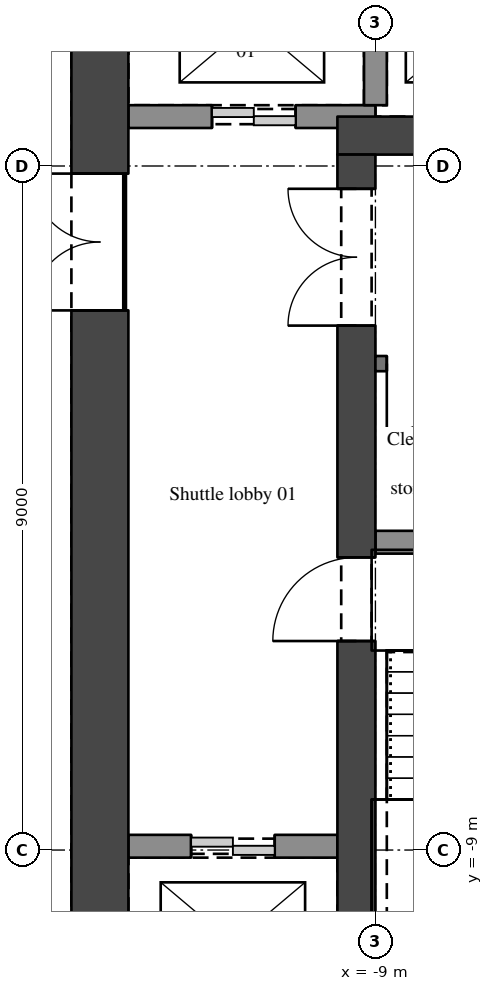
"""IFC4 building model, lengths in metres.
Left out: names, types, materials, properties, quantities, classifications, styles, units other than length and angle.
Written with IfcOpenShell. Run it as: python <this file> out.ifc"""

import sys

from ifc_helpers import new_model, si_unit, direction, frame, frame_2d, origin, place, context, subcontext, project, spatial, rectangle, extrude, element, fill, save


model = new_model("IFC4")
c1 = context("Model", 3, precision=1e-05, world=origin(), true_north=direction((0.0, 1.0)))
c2 = subcontext(c1, "Body", "Model", "MODEL_VIEW")
j1 = project(units=[si_unit("LENGTHUNIT", "METRE"), si_unit("PLANEANGLEUNIT", "RADIAN")], contexts=[c1])
p1 = place(None, origin())
s1 = spatial("IfcSite", under=j1, at=p1, CompositionType="ELEMENT")
p2 = place(p1, origin())
s2 = spatial("IfcBuilding", under=s1, at=p2, CompositionType="ELEMENT")
p3 = place(p2, frame((0.0, 0.0, 162.3)))
s3 = spatial("IfcBuildingStorey", under=s2, at=p3, CompositionType="ELEMENT", Elevation=162.3)
p4 = place(p3, frame((-12.625, -11.5, 0.0), z_axis=(0.0, 0.0, 1.0), x_axis=(0.0, 1.0, 0.0)))
e1 = element("IfcWall", 1, at=p4, inside=s3, PredefinedType="SHEAR", context=c2, shape_type="SweptSolid", body=[
    extrude(rectangle(XDim=14.65, YDim=0.75, at=frame_2d((7.325, 0.0))), origin(), (0.0, 0.0, 1.0), 5.4),
])
p5 = place(p4, frame((9.6, 0.0, 0.0)))
e2 = element("IfcOpeningElement", 2, at=p5, cuts=e1, PredefinedType="OPENING", context=c2, shape_type="SweptSolid", body=[
    extrude(rectangle(XDim=1.8, YDim=2.1, at=frame_2d((0.9, 1.05))), frame((0.0, 0.385, 0.0), z_axis=(0.0, -1.0, 0.0), x_axis=(1.0, 0.0, 0.0)), (0.0, 0.0, 1.0), 0.77),
])
p6 = place(p3, frame((-9.5, 0.4, 0.0), z_axis=(0.0, 0.0, 1.0), x_axis=(1.0, 0.0, 0.0)))
e3 = element("IfcWall", 3, at=p6, inside=s3, PredefinedType="SHEAR", context=c2, shape_type="SweptSolid", body=[
    extrude(rectangle(XDim=19.0, YDim=0.5, at=frame_2d((9.5, 0.0))), origin(), (0.0, 0.0, 1.0), 5.4),
])
p7 = place(p6, frame((1.3, 0.0, 0.0)))
e4 = element("IfcOpeningElement", 4, at=p7, cuts=e3, PredefinedType="OPENING", context=c2, shape_type="SweptSolid", body=[
    extrude(rectangle(XDim=1.1, YDim=2.1, at=frame_2d((0.55, 1.05))), frame((0.0, 0.26, 0.0), z_axis=(0.0, -1.0, 0.0), x_axis=(1.0, 0.0, 0.0)), (0.0, 0.0, 1.0), 0.52),
])
p8 = place(p6, frame((4.0, 0.0, 0.0)))
e5 = element("IfcOpeningElement", 5, at=p8, cuts=e3, PredefinedType="OPENING", context=c2, shape_type="SweptSolid", body=[
    extrude(rectangle(XDim=1.1, YDim=2.1, at=frame_2d((0.55, 1.05))), frame((0.0, 0.26, 0.0), z_axis=(0.0, -1.0, 0.0), x_axis=(1.0, 0.0, 0.0)), (0.0, 0.0, 1.0), 0.52),
])
p9 = place(p6, frame((6.7, 0.0, 0.0)))
e6 = element("IfcOpeningElement", 6, at=p9, cuts=e3, PredefinedType="OPENING", context=c2, shape_type="SweptSolid", body=[
    extrude(rectangle(XDim=1.1, YDim=2.1, at=frame_2d((0.55, 1.05))), frame((0.0, 0.26, 0.0), z_axis=(0.0, -1.0, 0.0), x_axis=(1.0, 0.0, 0.0)), (0.0, 0.0, 1.0), 0.52),
])
p10 = place(p6, frame((11.2, 0.0, 0.0)))
e7 = element("IfcOpeningElement", 7, at=p10, cuts=e3, PredefinedType="OPENING", context=c2, shape_type="SweptSolid", body=[
    extrude(rectangle(XDim=1.1, YDim=2.1, at=frame_2d((0.55, 1.05))), frame((0.0, 0.26, 0.0), z_axis=(0.0, -1.0, 0.0), x_axis=(1.0, 0.0, 0.0)), (0.0, 0.0, 1.0), 0.52),
])
p11 = place(p6, frame((13.9, 0.0, 0.0)))
e8 = element("IfcOpeningElement", 8, at=p11, cuts=e3, PredefinedType="OPENING", context=c2, shape_type="SweptSolid", body=[
    extrude(rectangle(XDim=1.1, YDim=2.1, at=frame_2d((0.55, 1.05))), frame((0.0, 0.26, 0.0), z_axis=(0.0, -1.0, 0.0), x_axis=(1.0, 0.0, 0.0)), (0.0, 0.0, 1.0), 0.52),
])
p12 = place(p6, frame((16.6, 0.0, 0.0)))
e9 = element("IfcOpeningElement", 9, at=p12, cuts=e3, PredefinedType="OPENING", context=c2, shape_type="SweptSolid", body=[
    extrude(rectangle(XDim=1.1, YDim=2.1, at=frame_2d((0.55, 1.05))), frame((0.0, 0.26, 0.0), z_axis=(0.0, -1.0, 0.0), x_axis=(1.0, 0.0, 0.0)), (0.0, 0.0, 1.0), 0.52),
])
p13 = place(p3, frame((-9.25, -11.5, 0.0), z_axis=(0.0, 0.0, 1.0), x_axis=(0.0, 1.0, 0.0)))
e10 = element("IfcWall", 10, at=p13, inside=s3, PredefinedType="SHEAR", context=c2, shape_type="SweptSolid", body=[
    extrude(rectangle(XDim=11.65, YDim=0.5, at=frame_2d((5.825, 0.0))), origin(), (0.0, 0.0, 1.0), 5.4),
])
p14 = place(p13, frame((9.4, 0.0, 0.0)))
e11 = element("IfcOpeningElement", 11, at=p14, cuts=e10, PredefinedType="OPENING", context=c2, shape_type="SweptSolid", body=[
    extrude(rectangle(XDim=1.8, YDim=2.1, at=frame_2d((0.9, 1.05))), frame((0.0, 0.26, 0.0), z_axis=(0.0, -1.0, 0.0), x_axis=(1.0, 0.0, 0.0)), (0.0, 0.0, 1.0), 0.52),
])
p15 = place(p13, frame((5.25, 0.0, 0.0)))
e12 = element("IfcOpeningElement", 12, at=p15, cuts=e10, PredefinedType="OPENING", context=c2, shape_type="SweptSolid", body=[
    extrude(rectangle(XDim=1.1, YDim=2.1, at=frame_2d((0.55, 1.05))), frame((0.0, 0.26, 0.0), z_axis=(0.0, -1.0, 0.0), x_axis=(1.0, 0.0, 0.0)), (0.0, 0.0, 1.0), 0.52),
])
p16 = place(p3, frame((-12.25, -8.95, 0.0), z_axis=(0.0, 0.0, 1.0), x_axis=(1.0, 0.0, 0.0)))
e13 = element("IfcWall", 13, at=p16, inside=s3, PredefinedType="SHEAR", context=c2, shape_type="SweptSolid", body=[
    extrude(rectangle(XDim=2.75, YDim=0.3, at=frame_2d((1.375, 0.0))), origin(), (0.0, 0.0, 1.0), 5.4),
])
p17 = place(p16, frame((0.825, 0.0, 0.0)))
e14 = element("IfcOpeningElement", 14, at=p17, cuts=e13, PredefinedType="OPENING", context=c2, shape_type="SweptSolid", body=[
    extrude(rectangle(XDim=1.1, YDim=2.1, at=frame_2d((0.55, 1.05))), frame((0.0, 0.16, 0.0), z_axis=(0.0, -1.0, 0.0), x_axis=(1.0, 0.0, 0.0)), (0.0, 0.0, 1.0), 0.32),
])
p18 = place(p3, frame((-9.0, -4.95, 0.0), z_axis=(0.0, 0.0, 1.0), x_axis=(1.0, 0.0, 0.0)))
e15 = element("IfcWall", 15, at=p18, inside=s3, PredefinedType="SHEAR", context=c2, shape_type="SweptSolid", body=[
    extrude(rectangle(XDim=6.75, YDim=0.3, at=frame_2d((3.375, 0.0))), origin(), (0.0, 0.0, 1.0), 5.4),
])
p19 = place(p3, frame((-7.8, -2.6, 0.0), z_axis=(0.0, 0.0, 1.0), x_axis=(-1.0, 0.0, 0.0)))
e16 = element("IfcWall", 16, at=p19, inside=s3, PredefinedType="SOLIDWALL", context=c2, shape_type="SweptSolid", body=[
    extrude(rectangle(XDim=1.2, YDim=0.2, at=frame_2d((0.6, 0.0))), origin(), (0.0, 0.0, 1.0), 5.1),
])
p20 = place(p19, frame((0.15, 0.0, 0.0)))
e17 = element("IfcOpeningElement", 17, at=p20, cuts=e16, PredefinedType="OPENING", context=c2, shape_type="SweptSolid", body=[
    extrude(rectangle(XDim=0.9, YDim=2.1, at=frame_2d((0.45, 1.05))), frame((0.0, 0.11, 0.0), z_axis=(0.0, -1.0, 0.0), x_axis=(1.0, 0.0, 0.0)), (0.0, 0.0, 1.0), 0.22),
])
p21 = place(p3, frame((-9.0, 0.65, 0.0), z_axis=(0.0, 0.0, 1.0), x_axis=(-1.0, 0.0, 0.0)))
e18 = element("IfcWall", 18, at=p21, inside=s3, PredefinedType="SHEAR", context=c2, shape_type="SweptSolid", body=[
    extrude(rectangle(XDim=3.25, YDim=0.3, at=frame_2d((1.625, 0.0))), origin(), (0.0, 0.0, 1.0), 5.4),
])
p22 = place(p21, frame((1.05, 0.0, 0.0)))
e19 = element("IfcOpeningElement", 19, at=p22, cuts=e18, PredefinedType="OPENING", context=c2, shape_type="SweptSolid", body=[
    extrude(rectangle(XDim=1.1, YDim=2.1, at=frame_2d((0.55, 1.05))), frame((0.0, 0.16, 0.0), z_axis=(0.0, -1.0, 0.0), x_axis=(1.0, 0.0, 0.0)), (0.0, 0.0, 1.0), 0.32),
])
p23 = place(p3, frame((-9.0, 0.8, 0.0), z_axis=(0.0, 0.0, 1.0), x_axis=(0.0, 1.0, 0.0)))
e20 = element("IfcWall", 20, at=p23, inside=s3, PredefinedType="SHEAR", context=c2, shape_type="SweptSolid", body=[
    extrude(rectangle(XDim=2.35, YDim=0.3, at=frame_2d((1.175, 0.0))), origin(), (0.0, 0.0, 1.0), 5.4),
])
p24 = place(p5, origin())
e21 = element("IfcDoor", 21, at=p24, inside=s3, OperationType="DOUBLE_DOOR_SINGLE_SWING", PredefinedType="DOOR", context=c2, shape_type="SweptSolid", body=[
    extrude(rectangle(XDim=1.8, YDim=2.1, at=frame_2d((0.9, 1.05))), frame((0.0, 0.025, 0.0), z_axis=(0.0, -1.0, 0.0), x_axis=(1.0, 0.0, 0.0)), (0.0, 0.0, 1.0), 0.05),
])
fill(e2, e21)
p25 = place(p14, origin())
e22 = element("IfcDoor", 22, at=p25, inside=s3, OperationType="DOUBLE_DOOR_SINGLE_SWING", PredefinedType="DOOR", context=c2, shape_type="SweptSolid", body=[
    extrude(rectangle(XDim=1.8, YDim=2.1, at=frame_2d((0.9, 1.05))), frame((0.0, 0.025, 0.0), z_axis=(0.0, -1.0, 0.0), x_axis=(1.0, 0.0, 0.0)), (0.0, 0.0, 1.0), 0.05),
])
fill(e11, e22)
p26 = place(p15, origin())
e23 = element("IfcDoor", 23, at=p26, inside=s3, OperationType="SINGLE_SWING_LEFT", PredefinedType="DOOR", context=c2, shape_type="SweptSolid", body=[
    extrude(rectangle(XDim=1.1, YDim=2.1, at=frame_2d((0.55, 1.05))), frame((0.0, 0.025, 0.0), z_axis=(0.0, -1.0, 0.0), x_axis=(1.0, 0.0, 0.0)), (0.0, 0.0, 1.0), 0.05),
])
fill(e12, e23)
p27 = place(p20, origin())
e24 = element("IfcDoor", 24, at=p27, inside=s3, OperationType="SINGLE_SWING_RIGHT", PredefinedType="DOOR", context=c2, shape_type="SweptSolid", body=[
    extrude(rectangle(XDim=0.9, YDim=2.1, at=frame_2d((0.45, 1.05))), frame((0.0, 0.025, 0.0), z_axis=(0.0, -1.0, 0.0), x_axis=(1.0, 0.0, 0.0)), (0.0, 0.0, 1.0), 0.05),
])
fill(e17, e24)
p28 = place(p22, origin())
e25 = element("IfcDoor", 25, at=p28, inside=s3, OperationType="DOUBLE_DOOR_SLIDING", PredefinedType="DOOR", context=c2, shape_type="SweptSolid", body=[
    extrude(rectangle(XDim=1.1, YDim=2.1, at=frame_2d((0.55, 1.05))), frame((0.0, 0.025, 0.0), z_axis=(0.0, -1.0, 0.0), x_axis=(1.0, 0.0, 0.0)), (0.0, 0.0, 1.0), 0.05),
])
fill(e19, e25)
p29 = place(p17, origin())
e26 = element("IfcDoor", 26, at=p29, inside=s3, OperationType="DOUBLE_DOOR_SLIDING", PredefinedType="DOOR", context=c2, shape_type="SweptSolid", body=[
    extrude(rectangle(XDim=1.1, YDim=2.1, at=frame_2d((0.55, 1.05))), frame((0.0, 0.025, 0.0), z_axis=(0.0, -1.0, 0.0), x_axis=(1.0, 0.0, 0.0)), (0.0, 0.0, 1.0), 0.05),
])
fill(e14, e26)
save(model, sys.argv[1])
